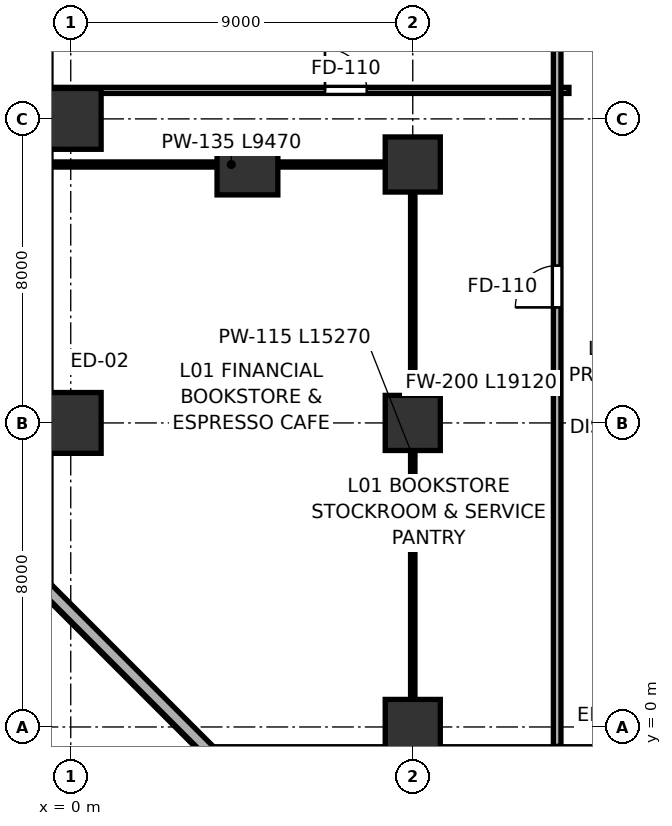
"""IFC4 building model, lengths in metres.
Left out: names, types, materials, properties, quantities, classifications, styles, units other than length and angle.
Written with IfcOpenShell. Run it as: python <this file> out.ifc"""

import sys

from ifc_helpers import new_model, si_unit, direction, frame, frame_2d, origin, origin_2d, place, context, subcontext, project, spatial, rectangle, extrude, source, transform, mapped, element, fill, save


model = new_model("IFC4")
c1 = context("Model", 3, precision=1e-05, world=origin(), true_north=direction((0.0, 1.0)))
c2 = subcontext(c1, "Body", "Model", "MODEL_VIEW")
j1 = project(units=[si_unit("LENGTHUNIT", "METRE"), si_unit("PLANEANGLEUNIT", "RADIAN")], contexts=[c1])
p1 = place(None, origin())
s1 = spatial("IfcSite", under=j1, at=p1, CompositionType="ELEMENT")
p2 = place(p1, origin())
s2 = spatial("IfcBuilding", under=s1, at=p2, CompositionType="ELEMENT")
p3 = place(p2, origin())
s3 = spatial("IfcBuildingStorey", under=s2, at=p3, CompositionType="ELEMENT", Elevation=0.0)
m1 = source(origin(), c2, "Body", "SweptSolid", [
    extrude(rectangle(XDim=1.6, YDim=1.6, at=origin_2d()), origin(), (0.0, 0.0, 1.0), 5.999),
])
for number, where, z_axis, x_axis in (
    (1, (0.0, 8.0, 0.001), (0.0, 0.0, 1.0), (1.0, 0.0, 0.0)),
    (2, (0.0, 16.0, 0.001), (0.0, 0.0, 1.0), (1.0, 0.0, 0.0)),
):
    element("IfcColumn", number, at=place(p3, frame(where, z_axis=z_axis, x_axis=x_axis)), inside=s3, PredefinedType="COLUMN", context=c2, shape_type="MappedRepresentation", body=[
        mapped(m1, transform((0.0, 0.0, 0.0), scale=1.0)),
    ])
m2 = source(origin(), c2, "Body", "SweptSolid", [
    extrude(rectangle(XDim=1.45, YDim=1.45, at=origin_2d()), origin(), (0.0, 0.0, 1.0), 5.999),
])
p4 = place(p3, frame((9.0, 0.0, 0.001), z_axis=(0.0, 0.0, 1.0), x_axis=(1.0, 0.0, 0.0)))
e3 = element("IfcColumn", 3, at=p4, inside=s3, PredefinedType="COLUMN", context=c2, shape_type="MappedRepresentation", body=[
    mapped(m2, transform((0.0, 0.0, 0.0), scale=1.0)),
])
m3 = source(origin(), c2, "Body", "SweptSolid", [
    extrude(rectangle(XDim=1.45, YDim=1.45, at=origin_2d()), origin(), (0.0, 0.0, 1.0), 5.999),
])
for number, where, z_axis, x_axis in (
    (4, (9.0, 8.0, 0.001), (0.0, 0.0, 1.0), (1.0, 0.0, 0.0)),
    (5, (9.0, 14.8, 0.001), (0.0, 0.0, 1.0), (1.0, 0.0, 0.0)),
):
    element("IfcColumn", number, at=place(p3, frame(where, z_axis=z_axis, x_axis=x_axis)), inside=s3, PredefinedType="COLUMN", context=c2, shape_type="MappedRepresentation", body=[
        mapped(m3, transform((0.0, 0.0, 0.0), scale=1.0)),
    ])
m4 = source(origin(), c2, "Body", "SweptSolid", [
    extrude(rectangle(XDim=1.6, YDim=1.6, at=origin_2d()), origin(), (0.0, 0.0, 1.0), 5.999),
])
p5 = place(p3, frame((4.65, 14.8, 0.001), z_axis=(0.0, 0.0, 1.0), x_axis=(1.0, 0.0, 0.0)))
e6 = element("IfcColumn", 6, at=p5, inside=s3, PredefinedType="COLUMN", context=c2, shape_type="MappedRepresentation", body=[
    mapped(m4, transform((0.0, 0.0, 0.0), scale=1.0)),
])
p6 = place(p3, frame((-0.744, 3.756, 0.0), z_axis=(0.0, 0.0, 1.0), x_axis=(0.707106781187, -0.707106781187, 0.0)))
e7 = element("IfcWall", 7, at=p6, inside=s3, PredefinedType="SOLIDWALL", context=c2, shape_type="SweptSolid", body=[
    extrude(rectangle(XDim=6.364, YDim=0.32, at=frame_2d((3.182, 0.0))), origin(), (0.0, 0.0, 1.0), 5.74),
])
p7 = place(p3, frame((-0.51, 16.75, 0.0), z_axis=(0.0, 0.0, 1.0), x_axis=(1.0, 0.0, 0.0)))
e8 = element("IfcWall", 8, at=p7, inside=s3, PredefinedType="PARTITIONING", context=c2, shape_type="SweptSolid", body=[
    extrude(rectangle(XDim=13.62, YDim=0.16, at=frame_2d((6.81, 0.0))), origin(), (0.0, 0.0, 1.0), 4.869),
])
p8 = place(p7, frame((7.2, 0.0, 0.0)))
e9 = element("IfcOpeningElement", 9, at=p8, cuts=e8, PredefinedType="OPENING", context=c2, shape_type="SweptSolid", body=[
    extrude(rectangle(XDim=1.1, YDim=2.2, at=frame_2d((0.55, 1.1))), frame((0.0, 0.09, 0.0), z_axis=(0.0, -1.0, 0.0), x_axis=(1.0, 0.0, 0.0)), (0.0, 0.0, 1.0), 0.18),
])
p9 = place(p3, frame((-0.51, 14.8, 0.0), z_axis=(0.0, 0.0, 1.0), x_axis=(1.0, 0.0, 0.0)))
e10 = element("IfcWall", 10, at=p9, inside=s3, PredefinedType="PARTITIONING", context=c2, shape_type="SweptSolid", body=[
    extrude(rectangle(XDim=9.47, YDim=0.135, at=frame_2d((4.735, 0.0))), origin(), (0.0, 0.0, 1.0), 2.5),
])
p10 = place(p3, frame((9.0, -0.51, 0.0), z_axis=(0.0, 0.0, 1.0), x_axis=(0.0, 1.0, 0.0)))
e11 = element("IfcWall", 11, at=p10, inside=s3, PredefinedType="PARTITIONING", context=c2, shape_type="SweptSolid", body=[
    extrude(rectangle(XDim=15.27, YDim=0.115, at=frame_2d((7.635, 0.0))), origin(), (0.0, 0.0, 1.0), 2.5),
])
p11 = place(p3, frame((12.8, -0.51, 0.0), z_axis=(0.0, 0.0, 1.0), x_axis=(0.0, 1.0, 0.0)))
e12 = element("IfcWall", 12, at=p11, inside=s3, PredefinedType="SOLIDWALL", context=c2, shape_type="SweptSolid", body=[
    extrude(rectangle(XDim=19.12, YDim=0.2, at=frame_2d((9.56, 0.0))), origin(), (0.0, 0.0, 1.0), 4.869),
])
p12 = place(p11, frame((11.55, 0.0, 0.0)))
e13 = element("IfcOpeningElement", 13, at=p12, cuts=e12, PredefinedType="OPENING", context=c2, shape_type="SweptSolid", body=[
    extrude(rectangle(XDim=1.1, YDim=2.2, at=frame_2d((0.55, 1.1))), frame((0.0, 0.11, 0.0), z_axis=(0.0, -1.0, 0.0), x_axis=(1.0, 0.0, 0.0)), (0.0, 0.0, 1.0), 0.22),
])
m5 = source(origin(), c2, "Body", "SweptSolid", [
    extrude(rectangle(XDim=1.1, YDim=2.2, at=frame_2d((0.55, 1.1))), frame((0.0, 0.025, 0.0), z_axis=(0.0, -1.0, 0.0), x_axis=(1.0, 0.0, 0.0)), (0.0, 0.0, 1.0), 0.05),
])
p13 = place(p8, origin())
e14 = element("IfcDoor", 14, at=p13, inside=s3, OperationType="SINGLE_SWING_LEFT", PredefinedType="DOOR", context=c2, shape_type="MappedRepresentation", body=[
    mapped(m5, transform((0.0, 0.0, 0.0), scale=1.0)),
])
fill(e9, e14)
p14 = place(p12, origin())
e15 = element("IfcDoor", 15, at=p14, inside=s3, OperationType="SINGLE_SWING_LEFT", PredefinedType="DOOR", context=c2, shape_type="MappedRepresentation", body=[
    mapped(m5, transform((0.0, 0.0, 0.0), scale=1.0)),
])
fill(e13, e15)
save(model, sys.argv[1])
